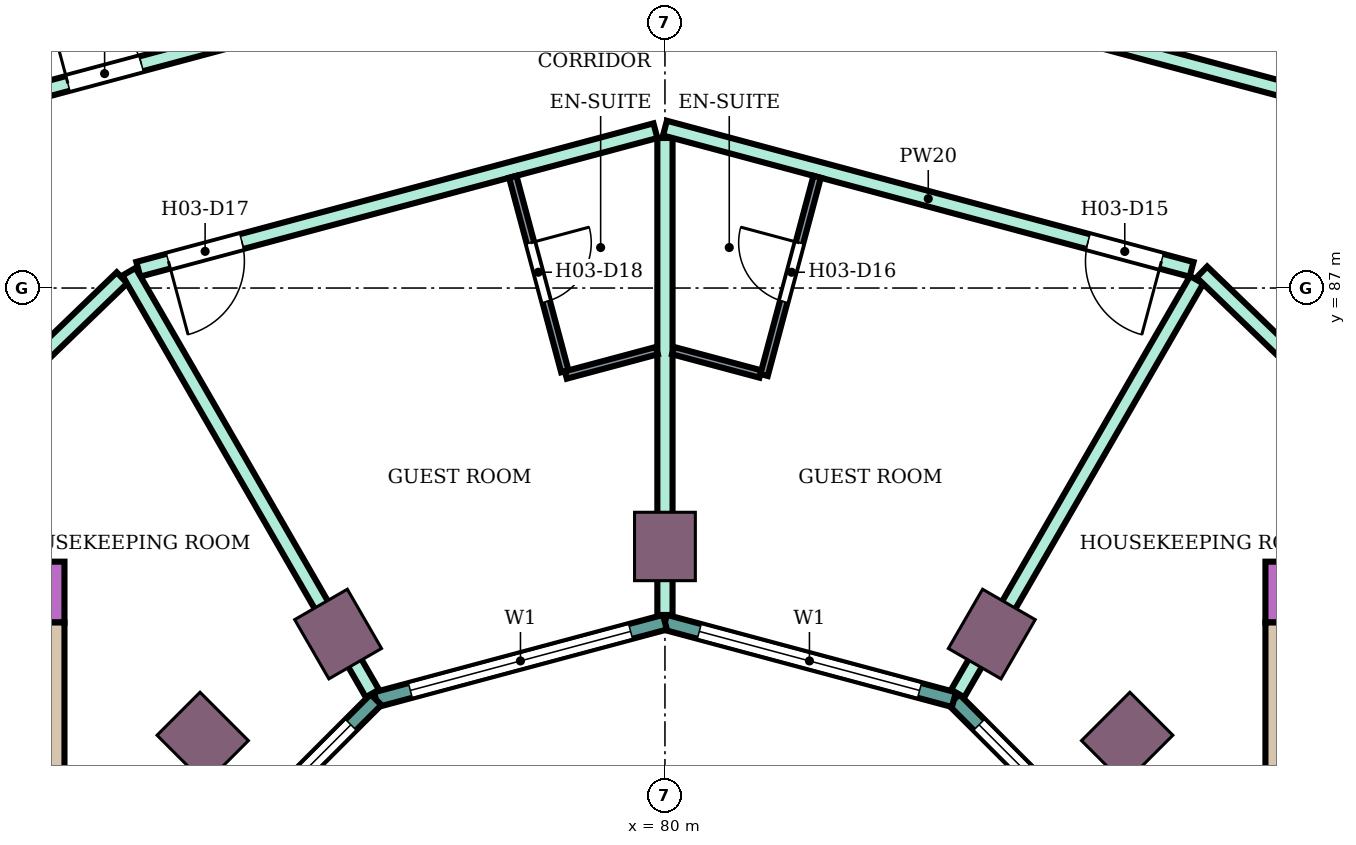
"""IFC4 building model, lengths in metres.
Left out: names, types, materials, properties, quantities, classifications, styles, units other than length and angle.
Written with IfcOpenShell. Run it as: python <this file> out.ifc"""

import sys

from ifc_helpers import new_model, si_unit, direction, frame, frame_2d, origin, origin_2d, place, context, subcontext, project, spatial, rectangle, extrude, element, fill, save


model = new_model("IFC4")
c1 = context("Model", 3, precision=1e-05, world=origin(), true_north=direction((0.0, 1.0)))
c2 = subcontext(c1, "Body", "Model", "MODEL_VIEW")
j1 = project(units=[si_unit("LENGTHUNIT", "METRE"), si_unit("PLANEANGLEUNIT", "RADIAN")], contexts=[c1])
p1 = place(None, origin())
s1 = spatial("IfcSite", under=j1, at=p1, CompositionType="ELEMENT")
p2 = place(p1, origin())
s2 = spatial("IfcBuilding", under=s1, at=p2, CompositionType="ELEMENT")
p3 = place(p2, frame((0.0, 0.0, 51.6)))
s3 = spatial("IfcBuildingStorey", under=s2, at=p3, CompositionType="ELEMENT", Elevation=51.6)
for number, where, z_axis, x_axis in (
    (1, (86.081, 81.081, 0.0), (0.0, 0.0, 1.0), (0.707, 0.707, 0.0)),
    (2, (84.3, 82.448, 0.0), (0.0, 0.0, 1.0), (0.5, 0.866, 0.0)),
    (3, (80.0, 83.6, 0.0), (0.0, 0.0, 1.0), (0.0, 1.0, 0.0)),
    (4, (75.7, 82.448, 0.0), (0.0, 0.0, 1.0), (-0.5, 0.866, 0.0)),
    (5, (73.919, 81.081, 0.0), (0.0, 0.0, 1.0), (-0.707, 0.707, 0.0)),
):
    element("IfcColumn", number, at=place(p3, frame(where, z_axis=z_axis, x_axis=x_axis)), inside=s3, PredefinedType="COLUMN", context=c2, shape_type="SweptSolid", body=[
        extrude(rectangle(XDim=0.9, YDim=0.8, at=origin_2d()), origin(), (0.0, 0.0, 1.0), 3.8),
    ])
p4 = place(p3, frame((87.9, 83.0, 0.0), z_axis=(0.0, 0.0, 1.0), x_axis=(1.0, 0.0, 0.0)))
e6 = element("IfcWall", 6, at=p4, inside=s3, PredefinedType="SHEAR", context=c2, shape_type="SweptSolid", body=[
    extrude(rectangle(XDim=14.7, YDim=0.8, at=frame_2d((7.35, 0.0))), origin(), (0.0, 0.0, 1.0), 3.48),
])
p5 = place(p4, frame((4.2, 0.0, 0.0)))
e7 = element("IfcOpeningElement", 7, at=p5, cuts=e6, PredefinedType="OPENING", context=c2, shape_type="SweptSolid", body=[
    extrude(rectangle(XDim=2.4, YDim=2.4, at=frame_2d((1.2, 1.2))), frame((0.0, 0.41, 0.0), z_axis=(0.0, -1.0, 0.0), x_axis=(1.0, 0.0, 0.0)), (0.0, 0.0, 1.0), 0.82),
])
p6 = place(p3, frame((88.125, 75.0, 0.0), z_axis=(0.0, 0.0, 1.0), x_axis=(0.0, 1.0, 0.0)))
e8 = element("IfcWall", 8, at=p6, inside=s3, PredefinedType="SHEAR", context=c2, shape_type="SweptSolid", body=[
    extrude(rectangle(XDim=7.6, YDim=0.45, at=frame_2d((3.8, 0.0))), origin(), (0.0, 0.0, 1.0), 3.48),
])
p7 = place(p3, frame((72.1, 83.0, 0.0), z_axis=(0.0, 0.0, 1.0), x_axis=(-1.0, 0.0, 0.0)))
e9 = element("IfcWall", 9, at=p7, inside=s3, PredefinedType="SHEAR", context=c2, shape_type="SweptSolid", body=[
    extrude(rectangle(XDim=14.7, YDim=0.8, at=frame_2d((7.35, 0.0))), origin(), (0.0, 0.0, 1.0), 3.48),
])
p8 = place(p7, frame((4.2, 0.0, 0.0)))
e10 = element("IfcOpeningElement", 10, at=p8, cuts=e9, PredefinedType="OPENING", context=c2, shape_type="SweptSolid", body=[
    extrude(rectangle(XDim=2.4, YDim=2.4, at=frame_2d((1.2, 1.2))), frame((0.0, 0.41, 0.0), z_axis=(0.0, -1.0, 0.0), x_axis=(1.0, 0.0, 0.0)), (0.0, 0.0, 1.0), 0.82),
])
p9 = place(p3, frame((71.875, 82.6, 0.0), z_axis=(0.0, 0.0, 1.0), x_axis=(0.0, -1.0, 0.0)))
e11 = element("IfcWall", 11, at=p9, inside=s3, PredefinedType="SHEAR", context=c2, shape_type="SweptSolid", body=[
    extrude(rectangle(XDim=7.6, YDim=0.45, at=frame_2d((3.8, 0.0))), origin(), (0.0, 0.0, 1.0), 3.48),
])
p10 = place(p3, frame((86.585, 78.802, 0.0), z_axis=(0.0, 0.0, 1.0), x_axis=(-0.707106781187, 0.707106781187, 0.0)))
e12 = element("IfcWall", 12, at=p10, inside=s3, PredefinedType="NOTDEFINED", context=c2, shape_type="SweptSolid", body=[
    extrude(rectangle(XDim=3.936, YDim=0.2, at=frame_2d((1.968, 0.0))), origin(), (0.0, 0.0, 1.0), 3.8),
])
p11 = place(p10, frame((0.468, 0.0, 0.9)))
e13 = element("IfcOpeningElement", 13, at=p11, cuts=e12, PredefinedType="OPENING", context=c2, shape_type="SweptSolid", body=[
    extrude(rectangle(XDim=3.0, YDim=2.3, at=frame_2d((1.5, 1.15))), frame((0.0, 0.11, 0.0), z_axis=(0.0, -1.0, 0.0), x_axis=(1.0, 0.0, 0.0)), (0.0, 0.0, 1.0), 0.22),
])
p12 = place(p3, frame((83.802, 81.585, 0.0), z_axis=(0.0, 0.0, 1.0), x_axis=(-0.965933654434, 0.258789828301, 0.0)))
e14 = element("IfcWall", 14, at=p12, inside=s3, PredefinedType="NOTDEFINED", context=c2, shape_type="SweptSolid", body=[
    extrude(rectangle(XDim=3.936, YDim=0.2, at=frame_2d((1.968, 0.0))), origin(), (0.0, 0.0, 1.0), 3.8),
])
p13 = place(p12, frame((0.468, 0.0, 0.9)))
e15 = element("IfcOpeningElement", 15, at=p13, cuts=e14, PredefinedType="OPENING", context=c2, shape_type="SweptSolid", body=[
    extrude(rectangle(XDim=3.0, YDim=2.3, at=frame_2d((1.5, 1.15))), frame((0.0, 0.11, 0.0), z_axis=(0.0, -1.0, 0.0), x_axis=(1.0, 0.0, 0.0)), (0.0, 0.0, 1.0), 0.22),
])
p14 = place(p3, frame((80.0, 82.604, 0.0), z_axis=(0.0, 0.0, 1.0), x_axis=(-0.965933654434, -0.258789828301, 0.0)))
e16 = element("IfcWall", 16, at=p14, inside=s3, PredefinedType="NOTDEFINED", context=c2, shape_type="SweptSolid", body=[
    extrude(rectangle(XDim=3.936, YDim=0.2, at=frame_2d((1.968, 0.0))), origin(), (0.0, 0.0, 1.0), 3.8),
])
p15 = place(p14, frame((0.468, 0.0, 0.9)))
e17 = element("IfcOpeningElement", 17, at=p15, cuts=e16, PredefinedType="OPENING", context=c2, shape_type="SweptSolid", body=[
    extrude(rectangle(XDim=3.0, YDim=2.3, at=frame_2d((1.5, 1.15))), frame((0.0, 0.11, 0.0), z_axis=(0.0, -1.0, 0.0), x_axis=(1.0, 0.0, 0.0)), (0.0, 0.0, 1.0), 0.22),
])
p16 = place(p3, frame((76.198, 81.585, 0.0), z_axis=(0.0, 0.0, 1.0), x_axis=(-0.707106781187, -0.707106781187, 0.0)))
e18 = element("IfcWall", 18, at=p16, inside=s3, PredefinedType="NOTDEFINED", context=c2, shape_type="SweptSolid", body=[
    extrude(rectangle(XDim=3.936, YDim=0.2, at=frame_2d((1.968, 0.0))), origin(), (0.0, 0.0, 1.0), 3.8),
])
p17 = place(p16, frame((0.468, 0.0, 0.9)))
e19 = element("IfcOpeningElement", 19, at=p17, cuts=e18, PredefinedType="OPENING", context=c2, shape_type="SweptSolid", body=[
    extrude(rectangle(XDim=3.0, YDim=2.3, at=frame_2d((1.5, 1.15))), frame((0.0, 0.11, 0.0), z_axis=(0.0, -1.0, 0.0), x_axis=(1.0, 0.0, 0.0)), (0.0, 0.0, 1.0), 0.22),
])
p18 = place(p3, frame((68.987, 83.4, 0.0), z_axis=(0.0, 0.0, 1.0), x_axis=(0.719547721855, 0.694442996922, 0.0)))
e20 = element("IfcWall", 20, at=p18, inside=s3, PredefinedType="PARTITIONING", context=c2, shape_type="SweptSolid", body=[
    extrude(rectangle(XDim=5.378, YDim=0.2, at=frame_2d((2.689, 0.0))), origin(), (0.0, 0.0, 1.0), 3.35),
])
p19 = place(p18, frame((2.294, 0.0, 0.0)))
e21 = element("IfcOpeningElement", 21, at=p19, cuts=e20, PredefinedType="OPENING", context=c2, shape_type="SweptSolid", body=[
    extrude(rectangle(XDim=0.9, YDim=2.1, at=frame_2d((0.45, 1.05))), frame((0.0, 0.11, 0.0), z_axis=(0.0, -1.0, 0.0), x_axis=(1.0, 0.0, 0.0)), (0.0, 0.0, 1.0), 0.22),
])
p20 = place(p3, frame((71.614, 89.55, 0.0), z_axis=(0.0, 0.0, 1.0), x_axis=(0.965967958589, 0.258661753994, 0.0)))
e22 = element("IfcWall", 22, at=p20, inside=s3, PredefinedType="PARTITIONING", context=c2, shape_type="SweptSolid", body=[
    extrude(rectangle(XDim=8.592, YDim=0.2, at=frame_2d((4.296, 0.0))), origin(), (0.0, 0.0, 1.0), 3.35),
])
p21 = place(p20, frame((0.55, 0.0, 0.0)))
e23 = element("IfcOpeningElement", 23, at=p21, cuts=e22, PredefinedType="OPENING", context=c2, shape_type="SweptSolid", body=[
    extrude(rectangle(XDim=1.0, YDim=2.1, at=frame_2d((0.5, 1.05))), frame((0.0, 0.11, 0.0), z_axis=(0.0, -1.0, 0.0), x_axis=(1.0, 0.0, 0.0)), (0.0, 0.0, 1.0), 0.22),
])
p22 = place(p3, frame((73.071, 87.247, 0.0), z_axis=(0.0, 0.0, 1.0), x_axis=(0.965931651205, 0.258797305243, 0.0)))
e24 = element("IfcWall", 24, at=p22, inside=s3, PredefinedType="PARTITIONING", context=c2, shape_type="SweptSolid", body=[
    extrude(rectangle(XDim=7.043, YDim=0.2, at=frame_2d((3.521, 0.0))), origin(), (0.0, 0.0, 1.0), 3.35),
])
p23 = place(p22, frame((0.41, 0.0, 0.0)))
e25 = element("IfcOpeningElement", 25, at=p23, cuts=e24, PredefinedType="OPENING", context=c2, shape_type="SweptSolid", body=[
    extrude(rectangle(XDim=1.0, YDim=2.1, at=frame_2d((0.5, 1.05))), frame((0.0, 0.11, 0.0), z_axis=(0.0, -1.0, 0.0), x_axis=(1.0, 0.0, 0.0)), (0.0, 0.0, 1.0), 0.22),
])
p24 = place(p3, frame((72.949, 87.214, 0.0), z_axis=(0.0, 0.0, 1.0), x_axis=(0.499927021214, -0.866067534006, 0.0)))
e26 = element("IfcWall", 26, at=p24, inside=s3, PredefinedType="PARTITIONING", context=c2, shape_type="SweptSolid", body=[
    extrude(rectangle(XDim=6.405, YDim=0.2, at=frame_2d((3.203, 0.0))), origin(), (0.0, 0.0, 1.0), 3.35),
])
p25 = place(p3, frame((80.0, 82.699, 0.0), z_axis=(0.0, 0.0, 1.0), x_axis=(0.0, 1.0, 0.0)))
e27 = element("IfcWall", 27, at=p25, inside=s3, PredefinedType="PARTITIONING", context=c2, shape_type="SweptSolid", body=[
    extrude(rectangle(XDim=6.275, YDim=0.2, at=frame_2d((3.138, 0.0))), origin(), (0.0, 0.0, 1.0), 3.35),
])
p26 = place(p3, frame((80.0, 89.104, 0.0), z_axis=(0.0, 0.0, 1.0), x_axis=(0.965856548257, -0.259077455964, 0.0)))
e28 = element("IfcWall", 28, at=p26, inside=s3, PredefinedType="PARTITIONING", context=c2, shape_type="SweptSolid", body=[
    extrude(rectangle(XDim=7.173, YDim=0.2, at=frame_2d((3.586, 0.0))), origin(), (0.0, 0.0, 1.0), 3.35),
])
p27 = place(p26, frame((5.763, 0.0, 0.0)))
e29 = element("IfcOpeningElement", 29, at=p27, cuts=e28, PredefinedType="OPENING", context=c2, shape_type="SweptSolid", body=[
    extrude(rectangle(XDim=1.0, YDim=2.1, at=frame_2d((0.5, 1.05))), frame((0.0, 0.11, 0.0), z_axis=(0.0, -1.0, 0.0), x_axis=(1.0, 0.0, 0.0)), (0.0, 0.0, 1.0), 0.22),
])
p28 = place(p3, frame((80.0, 91.797, 0.0), z_axis=(0.0, 0.0, 1.0), x_axis=(0.965857042792, -0.259075612301, 0.0)))
e30 = element("IfcWall", 30, at=p28, inside=s3, PredefinedType="PARTITIONING", context=c2, shape_type="SweptSolid", body=[
    extrude(rectangle(XDim=8.602, YDim=0.2, at=frame_2d((4.301, 0.0))), origin(), (0.0, 0.0, 1.0), 3.35),
])
p29 = place(p28, frame((4.877, 0.0, 0.0)))
e31 = element("IfcOpeningElement", 31, at=p29, cuts=e30, PredefinedType="OPENING", context=c2, shape_type="SweptSolid", body=[
    extrude(rectangle(XDim=1.0, YDim=2.1, at=frame_2d((0.5, 1.05))), frame((0.0, 0.11, 0.0), z_axis=(0.0, -1.0, 0.0), x_axis=(1.0, 0.0, 0.0)), (0.0, 0.0, 1.0), 0.22),
])
p30 = place(p28, frame((2.817, 0.0, 0.0)))
e32 = element("IfcOpeningElement", 32, at=p30, cuts=e30, PredefinedType="OPENING", context=c2, shape_type="SweptSolid", body=[
    extrude(rectangle(XDim=1.0, YDim=2.1, at=frame_2d((0.5, 1.05))), frame((0.0, 0.11, 0.0), z_axis=(0.0, -1.0, 0.0), x_axis=(1.0, 0.0, 0.0)), (0.0, 0.0, 1.0), 0.22),
])
p31 = place(p3, frame((83.851, 81.666, 0.0), z_axis=(0.0, 0.0, 1.0), x_axis=(0.500253653624, 0.865878907259, 0.0)))
e33 = element("IfcWall", 33, at=p31, inside=s3, PredefinedType="PARTITIONING", context=c2, shape_type="SweptSolid", body=[
    extrude(rectangle(XDim=6.285, YDim=0.2, at=frame_2d((3.143, 0.0))), origin(), (0.0, 0.0, 1.0), 3.35),
])
p32 = place(p3, frame((87.064, 87.211, 0.0), z_axis=(0.0, 0.0, 1.0), x_axis=(0.719562412484, -0.694427774891, 0.0)))
e34 = element("IfcWall", 34, at=p32, inside=s3, PredefinedType="PARTITIONING", context=c2, shape_type="SweptSolid", body=[
    extrude(rectangle(XDim=5.488, YDim=0.2, at=frame_2d((2.744, 0.0))), origin(), (0.0, 0.0, 1.0), 3.35),
])
p33 = place(p32, frame((2.294, 0.0, 0.0)))
e35 = element("IfcOpeningElement", 35, at=p33, cuts=e34, PredefinedType="OPENING", context=c2, shape_type="SweptSolid", body=[
    extrude(rectangle(XDim=0.9, YDim=2.1, at=frame_2d((0.45, 1.05))), frame((0.0, 0.11, 0.0), z_axis=(0.0, -1.0, 0.0), x_axis=(1.0, 0.0, 0.0)), (0.0, 0.0, 1.0), 0.22),
])
p34 = place(p3, frame((77.998, 88.463, 0.0), z_axis=(0.0, 0.0, 1.0), x_axis=(0.258677737588, -0.965963678446, 0.0)))
e36 = element("IfcWall", 36, at=p34, inside=s3, PredefinedType="PARTITIONING", context=c2, shape_type="SweptSolid", body=[
    extrude(rectangle(XDim=2.649, YDim=0.1, at=frame_2d((1.325, 0.0))), origin(), (0.0, 0.0, 1.0), 3.35),
])
p35 = place(p34, frame((0.9, 0.0, 0.0)))
e37 = element("IfcOpeningElement", 37, at=p35, cuts=e36, PredefinedType="OPENING", context=c2, shape_type="SweptSolid", body=[
    extrude(rectangle(XDim=0.8, YDim=2.1, at=frame_2d((0.4, 1.05))), frame((0.0, 0.06, 0.0), z_axis=(0.0, -1.0, 0.0), x_axis=(1.0, 0.0, 0.0)), (0.0, 0.0, 1.0), 0.12),
])
p36 = place(p3, frame((78.696, 85.856, 0.0), z_axis=(0.0, 0.0, 1.0), x_axis=(0.966002513606, 0.258532674351, 0.0)))
e38 = element("IfcWall", 38, at=p36, inside=s3, PredefinedType="PARTITIONING", context=c2, shape_type="SweptSolid", body=[
    extrude(rectangle(XDim=1.24, YDim=0.1, at=frame_2d((0.62, 0.0))), origin(), (0.0, 0.0, 1.0), 3.35),
])
p37 = place(p3, frame((80.106, 86.177, 0.0), z_axis=(0.0, 0.0, 1.0), x_axis=(0.966002973184, -0.258530957139, 0.0)))
e39 = element("IfcWall", 39, at=p37, inside=s3, PredefinedType="PARTITIONING", context=c2, shape_type="SweptSolid", body=[
    extrude(rectangle(XDim=1.19, YDim=0.1, at=frame_2d((0.595, 0.0))), origin(), (0.0, 0.0, 1.0), 3.35),
])
p38 = place(p3, frame((81.304, 85.856, 0.0), z_axis=(0.0, 0.0, 1.0), x_axis=(0.25867580527, 0.965964195904, 0.0)))
e40 = element("IfcWall", 40, at=p38, inside=s3, PredefinedType="PARTITIONING", context=c2, shape_type="SweptSolid", body=[
    extrude(rectangle(XDim=2.699, YDim=0.1, at=frame_2d((1.35, 0.0))), origin(), (0.0, 0.0, 1.0), 3.35),
])
p39 = place(p38, frame((1.0, 0.0, 0.0)))
e41 = element("IfcOpeningElement", 41, at=p39, cuts=e40, PredefinedType="OPENING", context=c2, shape_type="SweptSolid", body=[
    extrude(rectangle(XDim=0.8, YDim=2.1, at=frame_2d((0.4, 1.05))), frame((0.0, 0.06, 0.0), z_axis=(0.0, -1.0, 0.0), x_axis=(1.0, 0.0, 0.0)), (0.0, 0.0, 1.0), 0.12),
])
p40 = place(p11, origin())
e42 = element("IfcWindow", 42, at=p40, inside=s3, PartitioningType="SINGLE_PANEL", PredefinedType="WINDOW", context=c2, shape_type="SweptSolid", body=[
    extrude(rectangle(XDim=3.0, YDim=2.3, at=frame_2d((1.5, 1.15))), frame((0.0, 0.03, 0.0), z_axis=(0.0, -1.0, 0.0), x_axis=(1.0, 0.0, 0.0)), (0.0, 0.0, 1.0), 0.06),
])
fill(e13, e42)
p41 = place(p13, origin())
e43 = element("IfcWindow", 43, at=p41, inside=s3, PartitioningType="SINGLE_PANEL", PredefinedType="WINDOW", context=c2, shape_type="SweptSolid", body=[
    extrude(rectangle(XDim=3.0, YDim=2.3, at=frame_2d((1.5, 1.15))), frame((0.0, 0.03, 0.0), z_axis=(0.0, -1.0, 0.0), x_axis=(1.0, 0.0, 0.0)), (0.0, 0.0, 1.0), 0.06),
])
fill(e15, e43)
p42 = place(p15, origin())
e44 = element("IfcWindow", 44, at=p42, inside=s3, PartitioningType="SINGLE_PANEL", PredefinedType="WINDOW", context=c2, shape_type="SweptSolid", body=[
    extrude(rectangle(XDim=3.0, YDim=2.3, at=frame_2d((1.5, 1.15))), frame((0.0, 0.03, 0.0), z_axis=(0.0, -1.0, 0.0), x_axis=(1.0, 0.0, 0.0)), (0.0, 0.0, 1.0), 0.06),
])
fill(e17, e44)
p43 = place(p17, origin())
e45 = element("IfcWindow", 45, at=p43, inside=s3, PartitioningType="SINGLE_PANEL", PredefinedType="WINDOW", context=c2, shape_type="SweptSolid", body=[
    extrude(rectangle(XDim=3.0, YDim=2.3, at=frame_2d((1.5, 1.15))), frame((0.0, 0.03, 0.0), z_axis=(0.0, -1.0, 0.0), x_axis=(1.0, 0.0, 0.0)), (0.0, 0.0, 1.0), 0.06),
])
fill(e19, e45)
p44 = place(p21, origin())
e46 = element("IfcDoor", 46, at=p44, inside=s3, OperationType="SINGLE_SWING_LEFT", PredefinedType="DOOR", context=c2, shape_type="SweptSolid", body=[
    extrude(rectangle(XDim=1.0, YDim=2.1, at=frame_2d((0.5, 1.05))), frame((0.0, 0.025, 0.0), z_axis=(0.0, -1.0, 0.0), x_axis=(1.0, 0.0, 0.0)), (0.0, 0.0, 1.0), 0.05),
])
fill(e23, e46)
p45 = place(p27, frame((1.0, 0.0, 0.0), z_axis=(0.0, 0.0, 1.0), x_axis=(-1.0, 0.0, 0.0)))
e47 = element("IfcDoor", 47, at=p45, inside=s3, OperationType="SINGLE_SWING_LEFT", PredefinedType="DOOR", context=c2, shape_type="SweptSolid", body=[
    extrude(rectangle(XDim=1.0, YDim=2.1, at=frame_2d((0.5, 1.05))), frame((0.0, 0.025, 0.0), z_axis=(0.0, -1.0, 0.0), x_axis=(1.0, 0.0, 0.0)), (0.0, 0.0, 1.0), 0.05),
])
fill(e29, e47)
p46 = place(p39, origin())
e48 = element("IfcDoor", 48, at=p46, inside=s3, OperationType="SINGLE_SWING_RIGHT", PredefinedType="DOOR", context=c2, shape_type="SweptSolid", body=[
    extrude(rectangle(XDim=0.8, YDim=2.1, at=frame_2d((0.4, 1.05))), frame((0.0, 0.025, 0.0), z_axis=(0.0, -1.0, 0.0), x_axis=(1.0, 0.0, 0.0)), (0.0, 0.0, 1.0), 0.05),
])
fill(e41, e48)
p47 = place(p23, frame((1.0, 0.0, 0.0), z_axis=(0.0, 0.0, 1.0), x_axis=(-1.0, 0.0, 0.0)))
e49 = element("IfcDoor", 49, at=p47, inside=s3, OperationType="SINGLE_SWING_RIGHT", PredefinedType="DOOR", context=c2, shape_type="SweptSolid", body=[
    extrude(rectangle(XDim=1.0, YDim=2.1, at=frame_2d((0.5, 1.05))), frame((0.0, 0.025, 0.0), z_axis=(0.0, -1.0, 0.0), x_axis=(1.0, 0.0, 0.0)), (0.0, 0.0, 1.0), 0.05),
])
fill(e25, e49)
p48 = place(p35, origin())
e50 = element("IfcDoor", 50, at=p48, inside=s3, OperationType="SINGLE_SWING_LEFT", PredefinedType="DOOR", context=c2, shape_type="SweptSolid", body=[
    extrude(rectangle(XDim=0.8, YDim=2.1, at=frame_2d((0.4, 1.05))), frame((0.0, 0.025, 0.0), z_axis=(0.0, -1.0, 0.0), x_axis=(1.0, 0.0, 0.0)), (0.0, 0.0, 1.0), 0.05),
])
fill(e37, e50)
save(model, sys.argv[1])
